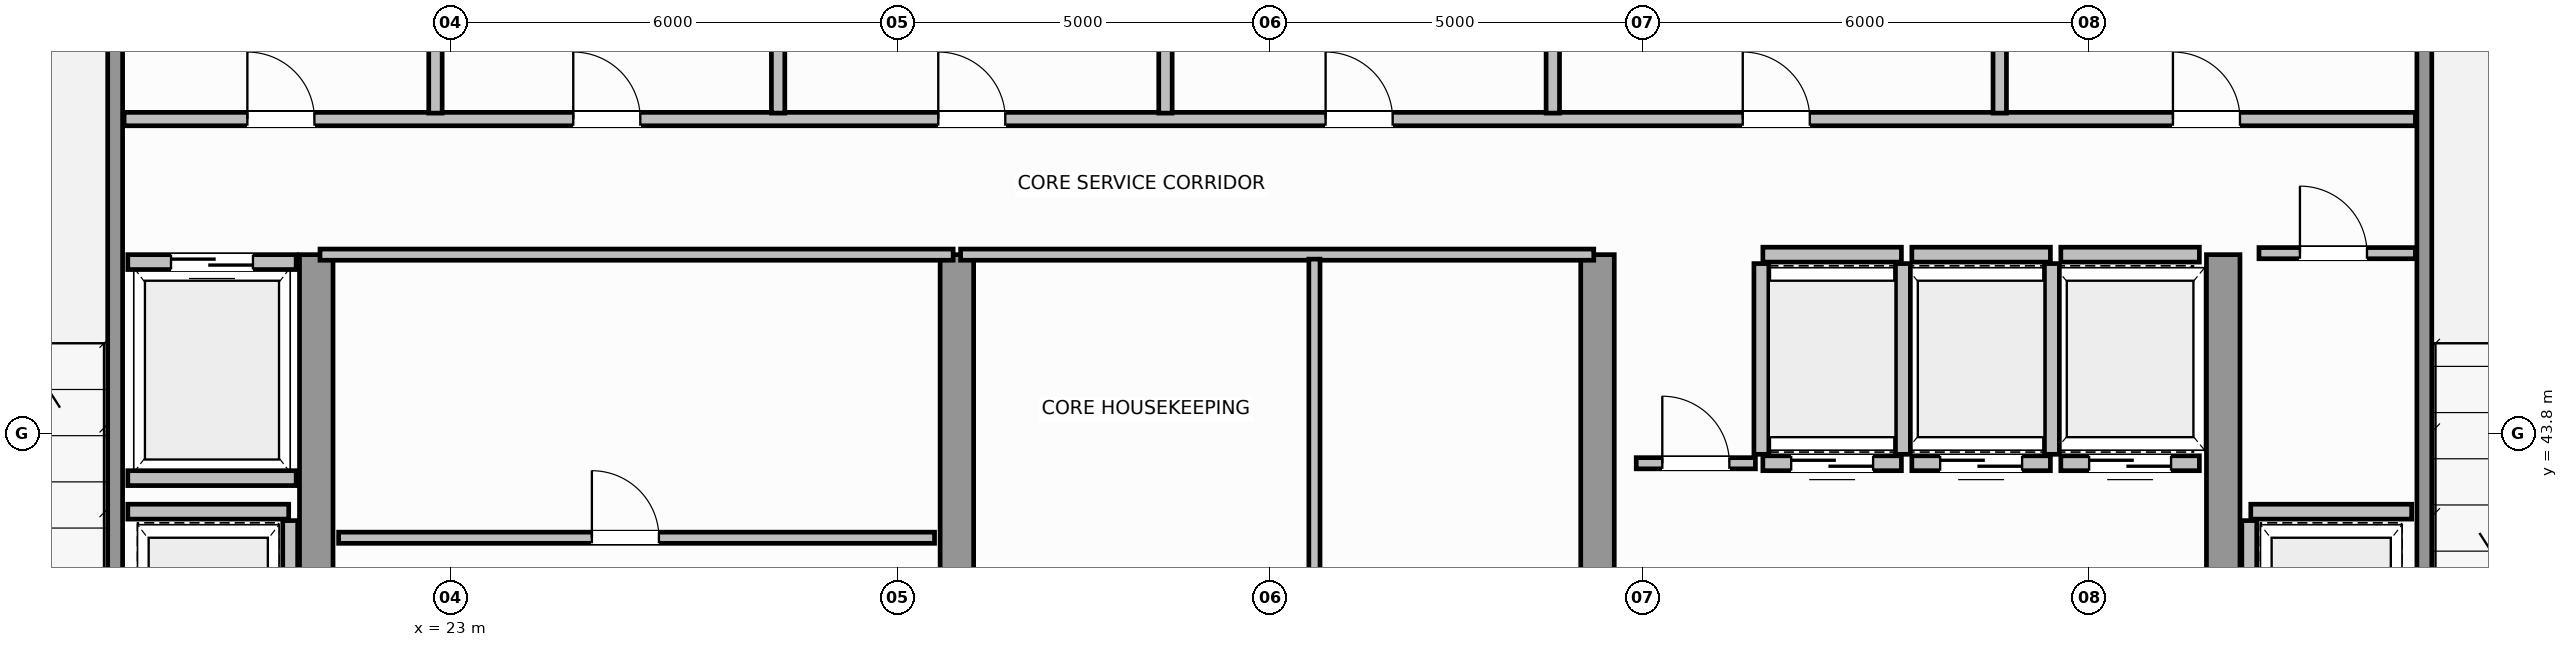
"""IFC4 building model, lengths in metres.
Left out: names, types, materials, properties, quantities, classifications, styles, units other than length and angle.
Written with IfcOpenShell. Run it as: python <this file> out.ifc"""

import sys

from ifc_helpers import new_model, si_unit, direction, frame, frame_2d, origin, place, context, subcontext, project, spatial, rectangle, extrude, source, transform, mapped, element, fill, save


model = new_model("IFC4")
c1 = context("Model", 3, precision=1e-05, world=origin(), true_north=direction((0.0, 1.0)))
c2 = subcontext(c1, "Body", "Model", "MODEL_VIEW")
j1 = project(units=[si_unit("LENGTHUNIT", "METRE"), si_unit("PLANEANGLEUNIT", "RADIAN")], contexts=[c1])
p1 = place(None, origin())
s1 = spatial("IfcSite", under=j1, at=p1, CompositionType="ELEMENT")
p2 = place(p1, origin())
s2 = spatial("IfcBuilding", under=s1, at=p2, CompositionType="ELEMENT")
p3 = place(p2, frame((0.0, 0.0, 295.4)))
s3 = spatial("IfcBuildingStorey", under=s2, at=p3, CompositionType="ELEMENT", Elevation=295.4)
for number, where, z_axis, x_axis in (
    (1, (21.2, 36.745, 0.0), (0.0, 0.0, 1.0), (0.0, 1.0, 0.0)),
    (2, (29.8, 36.745, 0.0), (0.0, 0.0, 1.0), (0.0, 1.0, 0.0)),
    (3, (38.4, 36.745, 0.0), (0.0, 0.0, 1.0), (0.0, 1.0, 0.0)),
    (4, (46.8, 36.745, 0.0), (0.0, 0.0, 1.0), (0.0, 1.0, 0.0)),
):
    element("IfcWall", number, at=place(p3, frame(where, z_axis=z_axis, x_axis=x_axis)), inside=s3, PredefinedType="SHEAR", context=c2, shape_type="SweptSolid", body=[
        extrude(rectangle(XDim=9.455, YDim=0.45, at=frame_2d((4.728, 0.0))), origin(), (0.0, 0.0, 1.0), 3.8),
    ])
for number, where, z_axis, x_axis in (
    (5, (18.5, 39.96, 0.0), (0.0, 0.0, 1.0), (0.0, 1.0, 0.0)),
    (6, (49.5, 39.96, 0.0), (0.0, 0.0, 1.0), (0.0, 1.0, 0.0)),
):
    element("IfcWall", number, at=place(p3, frame(where, z_axis=z_axis, x_axis=x_axis)), inside=s3, PredefinedType="SOLIDWALL", context=c2, shape_type="SweptSolid", body=[
        extrude(rectangle(XDim=9.93, YDim=0.2, at=frame_2d((4.965, 0.0))), origin(), (0.0, 0.0, 1.0), 3.8),
    ])
p4 = place(p3, frame((40.62, 43.4, 0.0), z_axis=(0.0, 0.0, 1.0), x_axis=(1.0, 0.0, 0.0)))
e7 = element("IfcWall", 7, at=p4, inside=s3, PredefinedType="SOLIDWALL", context=c2, shape_type="SweptSolid", body=[
    extrude(rectangle(XDim=1.86, YDim=0.2, at=frame_2d((0.93, 0.0))), origin(), (0.0, 0.0, 1.0), 3.58),
])
p5 = place(p4, frame((0.38, 0.0, 0.0)))
e8 = element("IfcOpeningElement", 8, at=p5, cuts=e7, PredefinedType="OPENING", context=c2, shape_type="SweptSolid", body=[
    extrude(rectangle(XDim=1.1, YDim=2.15, at=frame_2d((0.55, 1.075))), frame((0.0, 0.11, 0.0), z_axis=(0.0, -1.0, 0.0), x_axis=(1.0, 0.0, 0.0)), (0.0, 0.0, 1.0), 0.22),
])
p6 = place(p3, frame((40.62, 46.2, 0.0), z_axis=(0.0, 0.0, 1.0), x_axis=(1.0, 0.0, 0.0)))
e9 = element("IfcWall", 9, at=p6, inside=s3, PredefinedType="SOLIDWALL", context=c2, shape_type="SweptSolid", body=[
    extrude(rectangle(XDim=1.86, YDim=0.2, at=frame_2d((0.93, 0.0))), origin(), (0.0, 0.0, 1.0), 3.58),
])
for number, where, z_axis, x_axis in (
    (10, (40.6, 43.52, 0.0), (0.0, 0.0, 1.0), (0.0, 1.0, 0.0)),
    (11, (42.5, 43.52, 0.0), (0.0, 0.0, 1.0), (0.0, 1.0, 0.0)),
):
    element("IfcWall", number, at=place(p3, frame(where, z_axis=z_axis, x_axis=x_axis)), inside=s3, PredefinedType="SOLIDWALL", context=c2, shape_type="SweptSolid", body=[
        extrude(rectangle(XDim=2.56, YDim=0.2, at=frame_2d((1.28, 0.0))), origin(), (0.0, 0.0, 1.0), 3.58),
    ])
p7 = place(p3, frame((42.62, 43.4, 0.0), z_axis=(0.0, 0.0, 1.0), x_axis=(1.0, 0.0, 0.0)))
e12 = element("IfcWall", 12, at=p7, inside=s3, PredefinedType="SOLIDWALL", context=c2, shape_type="SweptSolid", body=[
    extrude(rectangle(XDim=1.86, YDim=0.2, at=frame_2d((0.93, 0.0))), origin(), (0.0, 0.0, 1.0), 3.58),
])
p8 = place(p7, frame((0.38, 0.0, 0.0)))
e13 = element("IfcOpeningElement", 13, at=p8, cuts=e12, PredefinedType="OPENING", context=c2, shape_type="SweptSolid", body=[
    extrude(rectangle(XDim=1.1, YDim=2.15, at=frame_2d((0.55, 1.075))), frame((0.0, 0.11, 0.0), z_axis=(0.0, -1.0, 0.0), x_axis=(1.0, 0.0, 0.0)), (0.0, 0.0, 1.0), 0.22),
])
p9 = place(p3, frame((42.62, 46.2, 0.0), z_axis=(0.0, 0.0, 1.0), x_axis=(1.0, 0.0, 0.0)))
e14 = element("IfcWall", 14, at=p9, inside=s3, PredefinedType="SOLIDWALL", context=c2, shape_type="SweptSolid", body=[
    extrude(rectangle(XDim=1.86, YDim=0.2, at=frame_2d((0.93, 0.0))), origin(), (0.0, 0.0, 1.0), 3.58),
])
p10 = place(p3, frame((44.5, 43.52, 0.0), z_axis=(0.0, 0.0, 1.0), x_axis=(0.0, 1.0, 0.0)))
e15 = element("IfcWall", 15, at=p10, inside=s3, PredefinedType="SOLIDWALL", context=c2, shape_type="SweptSolid", body=[
    extrude(rectangle(XDim=2.56, YDim=0.2, at=frame_2d((1.28, 0.0))), origin(), (0.0, 0.0, 1.0), 3.58),
])
p11 = place(p3, frame((44.62, 43.4, 0.0), z_axis=(0.0, 0.0, 1.0), x_axis=(1.0, 0.0, 0.0)))
e16 = element("IfcWall", 16, at=p11, inside=s3, PredefinedType="SOLIDWALL", context=c2, shape_type="SweptSolid", body=[
    extrude(rectangle(XDim=1.86, YDim=0.2, at=frame_2d((0.93, 0.0))), origin(), (0.0, 0.0, 1.0), 3.58),
])
p12 = place(p11, frame((0.38, 0.0, 0.0)))
e17 = element("IfcOpeningElement", 17, at=p12, cuts=e16, PredefinedType="OPENING", context=c2, shape_type="SweptSolid", body=[
    extrude(rectangle(XDim=1.1, YDim=2.15, at=frame_2d((0.55, 1.075))), frame((0.0, 0.11, 0.0), z_axis=(0.0, -1.0, 0.0), x_axis=(1.0, 0.0, 0.0)), (0.0, 0.0, 1.0), 0.22),
])
p13 = place(p3, frame((44.62, 46.2, 0.0), z_axis=(0.0, 0.0, 1.0), x_axis=(1.0, 0.0, 0.0)))
e18 = element("IfcWall", 18, at=p13, inside=s3, PredefinedType="SOLIDWALL", context=c2, shape_type="SweptSolid", body=[
    extrude(rectangle(XDim=1.86, YDim=0.2, at=frame_2d((0.93, 0.0))), origin(), (0.0, 0.0, 1.0), 3.58),
])
p14 = place(p3, frame((18.67, 46.1, 0.0), z_axis=(0.0, 0.0, 1.0), x_axis=(1.0, 0.0, 0.0)))
e19 = element("IfcWall", 19, at=p14, inside=s3, PredefinedType="SOLIDWALL", context=c2, shape_type="SweptSolid", body=[
    extrude(rectangle(XDim=2.26, YDim=0.2, at=frame_2d((1.13, 0.0))), origin(), (0.0, 0.0, 1.0), 3.58),
])
p15 = place(p14, frame((0.58, 0.0, 0.0)))
e20 = element("IfcOpeningElement", 20, at=p15, cuts=e19, PredefinedType="OPENING", context=c2, shape_type="SweptSolid", body=[
    extrude(rectangle(XDim=1.1, YDim=2.15, at=frame_2d((0.55, 1.075))), frame((0.0, 0.11, 0.0), z_axis=(0.0, -1.0, 0.0), x_axis=(1.0, 0.0, 0.0)), (0.0, 0.0, 1.0), 0.22),
])
p16 = place(p3, frame((18.67, 43.2, 0.0), z_axis=(0.0, 0.0, 1.0), x_axis=(1.0, 0.0, 0.0)))
e21 = element("IfcWall", 21, at=p16, inside=s3, PredefinedType="SOLIDWALL", context=c2, shape_type="SweptSolid", body=[
    extrude(rectangle(XDim=2.26, YDim=0.2, at=frame_2d((1.13, 0.0))), origin(), (0.0, 0.0, 1.0), 3.58),
])
p17 = place(p3, frame((18.67, 42.75, 0.0), z_axis=(0.0, 0.0, 1.0), x_axis=(1.0, 0.0, 0.0)))
e22 = element("IfcWall", 22, at=p17, inside=s3, PredefinedType="SOLIDWALL", context=c2, shape_type="SweptSolid", body=[
    extrude(rectangle(XDim=2.16, YDim=0.2, at=frame_2d((1.08, 0.0))), origin(), (0.0, 0.0, 1.0), 3.58),
])
p18 = place(p3, frame((20.85, 40.07, 0.0), z_axis=(0.0, 0.0, 1.0), x_axis=(0.0, 1.0, 0.0)))
e23 = element("IfcWall", 23, at=p18, inside=s3, PredefinedType="SOLIDWALL", context=c2, shape_type="SweptSolid", body=[
    extrude(rectangle(XDim=2.56, YDim=0.2, at=frame_2d((1.28, 0.0))), origin(), (0.0, 0.0, 1.0), 3.58),
])
p19 = place(p3, frame((47.17, 42.75, 0.0), z_axis=(0.0, 0.0, 1.0), x_axis=(1.0, 0.0, 0.0)))
e24 = element("IfcWall", 24, at=p19, inside=s3, PredefinedType="SOLIDWALL", context=c2, shape_type="SweptSolid", body=[
    extrude(rectangle(XDim=2.16, YDim=0.2, at=frame_2d((1.08, 0.0))), origin(), (0.0, 0.0, 1.0), 3.58),
])
p20 = place(p3, frame((47.15, 40.07, 0.0), z_axis=(0.0, 0.0, 1.0), x_axis=(0.0, 1.0, 0.0)))
e25 = element("IfcWall", 25, at=p20, inside=s3, PredefinedType="SOLIDWALL", context=c2, shape_type="SweptSolid", body=[
    extrude(rectangle(XDim=2.56, YDim=0.2, at=frame_2d((1.28, 0.0))), origin(), (0.0, 0.0, 1.0), 3.58),
])
p21 = place(p3, frame((21.25, 46.2, 0.0), z_axis=(0.0, 0.0, 1.0), x_axis=(1.0, 0.0, 0.0)))
e26 = element("IfcWall", 26, at=p21, inside=s3, PredefinedType="PARTITIONING", context=c2, shape_type="SweptSolid", body=[
    extrude(rectangle(XDim=8.5, YDim=0.15, at=frame_2d((4.25, 0.0))), origin(), (0.0, 0.0, 1.0), 3.58),
])
p22 = place(p3, frame((21.5, 42.4, 0.0), z_axis=(0.0, 0.0, 1.0), x_axis=(1.0, 0.0, 0.0)))
e27 = element("IfcWall", 27, at=p22, inside=s3, PredefinedType="PARTITIONING", context=c2, shape_type="SweptSolid", body=[
    extrude(rectangle(XDim=8.0, YDim=0.15, at=frame_2d((4.0, 0.0))), origin(), (0.0, 0.0, 1.0), 3.58),
])
p23 = place(p22, frame((3.4, 0.0, 0.0)))
e28 = element("IfcOpeningElement", 28, at=p23, cuts=e27, PredefinedType="OPENING", context=c2, shape_type="SweptSolid", body=[
    extrude(rectangle(XDim=0.9, YDim=2.1, at=frame_2d((0.45, 1.05))), frame((0.0, 0.085, 0.0), z_axis=(0.0, -1.0, 0.0), x_axis=(1.0, 0.0, 0.0)), (0.0, 0.0, 1.0), 0.17),
])
p24 = place(p3, frame((29.85, 46.2, 0.0), z_axis=(0.0, 0.0, 1.0), x_axis=(1.0, 0.0, 0.0)))
e29 = element("IfcWall", 29, at=p24, inside=s3, PredefinedType="PARTITIONING", context=c2, shape_type="SweptSolid", body=[
    extrude(rectangle(XDim=8.5, YDim=0.15, at=frame_2d((4.25, 0.0))), origin(), (0.0, 0.0, 1.0), 3.58),
])
p25 = place(p3, frame((34.6, 36.56, 0.0), z_axis=(0.0, 0.0, 1.0), x_axis=(0.0, 1.0, 0.0)))
e30 = element("IfcWall", 30, at=p25, inside=s3, PredefinedType="PARTITIONING", context=c2, shape_type="SweptSolid", body=[
    extrude(rectangle(XDim=9.58, YDim=0.15, at=frame_2d((4.79, 0.0))), origin(), (0.0, 0.0, 1.0), 3.58),
])
p26 = place(p25, frame((4.2, 0.0, 0.0)))
e31 = element("IfcOpeningElement", 31, at=p26, cuts=e30, PredefinedType="OPENING", context=c2, shape_type="SweptSolid", body=[
    extrude(rectangle(XDim=0.9, YDim=2.1, at=frame_2d((0.45, 1.05))), frame((0.0, 0.085, 0.0), z_axis=(0.0, -1.0, 0.0), x_axis=(1.0, 0.0, 0.0)), (0.0, 0.0, 1.0), 0.17),
])
p27 = place(p3, frame((47.28, 46.22, 0.0), z_axis=(0.0, 0.0, 1.0), x_axis=(1.0, 0.0, 0.0)))
e32 = element("IfcWall", 32, at=p27, inside=s3, PredefinedType="PARTITIONING", context=c2, shape_type="SweptSolid", body=[
    extrude(rectangle(XDim=2.1, YDim=0.15, at=frame_2d((1.05, 0.0))), origin(), (0.0, 0.0, 1.0), 3.58),
])
p28 = place(p27, frame((0.55, 0.0, 0.0)))
e33 = element("IfcOpeningElement", 33, at=p28, cuts=e32, PredefinedType="OPENING", context=c2, shape_type="SweptSolid", body=[
    extrude(rectangle(XDim=0.9, YDim=2.1, at=frame_2d((0.45, 1.05))), frame((0.0, 0.085, 0.0), z_axis=(0.0, -1.0, 0.0), x_axis=(1.0, 0.0, 0.0)), (0.0, 0.0, 1.0), 0.17),
])
p29 = place(p3, frame((38.92, 43.4, 0.0), z_axis=(0.0, 0.0, 1.0), x_axis=(1.0, 0.0, 0.0)))
e34 = element("IfcWall", 34, at=p29, inside=s3, PredefinedType="PARTITIONING", context=c2, shape_type="SweptSolid", body=[
    extrude(rectangle(XDim=1.6, YDim=0.15, at=frame_2d((0.8, 0.0))), origin(), (0.0, 0.0, 1.0), 3.58),
])
p30 = place(p29, frame((0.35, 0.0, 0.0)))
e35 = element("IfcOpeningElement", 35, at=p30, cuts=e34, PredefinedType="OPENING", context=c2, shape_type="SweptSolid", body=[
    extrude(rectangle(XDim=0.9, YDim=2.1, at=frame_2d((0.45, 1.05))), frame((0.0, 0.085, 0.0), z_axis=(0.0, -1.0, 0.0), x_axis=(1.0, 0.0, 0.0)), (0.0, 0.0, 1.0), 0.17),
])
p31 = place(p3, frame((18.62, 48.02, 0.0), z_axis=(0.0, 0.0, 1.0), x_axis=(1.0, 0.0, 0.0)))
e36 = element("IfcWall", 36, at=p31, inside=s3, PredefinedType="PLUMBINGWALL", context=c2, shape_type="SweptSolid", body=[
    extrude(rectangle(XDim=30.76, YDim=0.18, at=frame_2d((15.38, 0.0))), origin(), (0.0, 0.0, 1.0), 3.58),
])
p32 = place(p31, frame((1.655, 0.0, 0.0)))
e37 = element("IfcOpeningElement", 37, at=p32, cuts=e36, PredefinedType="OPENING", context=c2, shape_type="SweptSolid", body=[
    extrude(rectangle(XDim=0.9, YDim=2.15, at=frame_2d((0.45, 1.075))), frame((0.0, 0.1, 0.0), z_axis=(0.0, -1.0, 0.0), x_axis=(1.0, 0.0, 0.0)), (0.0, 0.0, 1.0), 0.2),
])
p33 = place(p31, frame((6.03, 0.0, 0.0)))
e38 = element("IfcOpeningElement", 38, at=p33, cuts=e36, PredefinedType="OPENING", context=c2, shape_type="SweptSolid", body=[
    extrude(rectangle(XDim=0.9, YDim=2.15, at=frame_2d((0.45, 1.075))), frame((0.0, 0.1, 0.0), z_axis=(0.0, -1.0, 0.0), x_axis=(1.0, 0.0, 0.0)), (0.0, 0.0, 1.0), 0.2),
])
p34 = place(p31, frame((10.93, 0.0, 0.0)))
e39 = element("IfcOpeningElement", 39, at=p34, cuts=e36, PredefinedType="OPENING", context=c2, shape_type="SweptSolid", body=[
    extrude(rectangle(XDim=0.9, YDim=2.15, at=frame_2d((0.45, 1.075))), frame((0.0, 0.1, 0.0), z_axis=(0.0, -1.0, 0.0), x_axis=(1.0, 0.0, 0.0)), (0.0, 0.0, 1.0), 0.2),
])
p35 = place(p31, frame((16.13, 0.0, 0.0)))
e40 = element("IfcOpeningElement", 40, at=p35, cuts=e36, PredefinedType="OPENING", context=c2, shape_type="SweptSolid", body=[
    extrude(rectangle(XDim=0.9, YDim=2.15, at=frame_2d((0.45, 1.075))), frame((0.0, 0.1, 0.0), z_axis=(0.0, -1.0, 0.0), x_axis=(1.0, 0.0, 0.0)), (0.0, 0.0, 1.0), 0.2),
])
p36 = place(p31, frame((21.73, 0.0, 0.0)))
e41 = element("IfcOpeningElement", 41, at=p36, cuts=e36, PredefinedType="OPENING", context=c2, shape_type="SweptSolid", body=[
    extrude(rectangle(XDim=0.9, YDim=2.15, at=frame_2d((0.45, 1.075))), frame((0.0, 0.1, 0.0), z_axis=(0.0, -1.0, 0.0), x_axis=(1.0, 0.0, 0.0)), (0.0, 0.0, 1.0), 0.2),
])
p37 = place(p31, frame((27.505, 0.0, 0.0)))
e42 = element("IfcOpeningElement", 42, at=p37, cuts=e36, PredefinedType="OPENING", context=c2, shape_type="SweptSolid", body=[
    extrude(rectangle(XDim=0.9, YDim=2.15, at=frame_2d((0.45, 1.075))), frame((0.0, 0.1, 0.0), z_axis=(0.0, -1.0, 0.0), x_axis=(1.0, 0.0, 0.0)), (0.0, 0.0, 1.0), 0.2),
])
p38 = place(p3, frame((22.8, 48.1, 0.0), z_axis=(0.0, 0.0, 1.0), x_axis=(0.0, 1.0, 0.0)))
e43 = element("IfcWall", 43, at=p38, inside=s3, PredefinedType="PLUMBINGWALL", context=c2, shape_type="SweptSolid", body=[
    extrude(rectangle(XDim=2.43, YDim=0.18, at=frame_2d((1.215, 0.0))), origin(), (0.0, 0.0, 1.0), 3.12),
])
for number, where, z_axis, x_axis in (
    (44, (27.4, 48.1, 0.0), (0.0, 0.0, 1.0), (0.0, 1.0, 0.0)),
    (45, (32.6, 48.1, 0.0), (0.0, 0.0, 1.0), (0.0, 1.0, 0.0)),
    (46, (37.8, 48.1, 0.0), (0.0, 0.0, 1.0), (0.0, 1.0, 0.0)),
    (47, (43.8, 48.1, 0.0), (0.0, 0.0, 1.0), (0.0, 1.0, 0.0)),
):
    element("IfcWall", number, at=place(p3, frame(where, z_axis=z_axis, x_axis=x_axis)), inside=s3, PredefinedType="PLUMBINGWALL", context=c2, shape_type="SweptSolid", body=[
        extrude(rectangle(XDim=2.43, YDim=0.18, at=frame_2d((1.215, 0.0))), origin(), (0.0, 0.0, 1.0), 3.58),
    ])
m1 = source(origin(), c2, "Body", "SweptSolid", [
    extrude(rectangle(XDim=1.1, YDim=2.15, at=frame_2d((0.55, 1.075))), frame((0.0, 0.025, 0.0), z_axis=(0.0, -1.0, 0.0), x_axis=(1.0, 0.0, 0.0)), (0.0, 0.0, 1.0), 0.05),
])
p39 = place(p5, origin())
e48 = element("IfcDoor", 48, at=p39, inside=s3, OperationType="DOUBLE_DOOR_SLIDING", PredefinedType="DOOR", context=c2, shape_type="MappedRepresentation", body=[
    mapped(m1, transform((0.0, 0.0, 0.0), scale=1.0)),
])
fill(e8, e48)
p40 = place(p8, origin())
e49 = element("IfcDoor", 49, at=p40, inside=s3, OperationType="DOUBLE_DOOR_SLIDING", PredefinedType="DOOR", context=c2, shape_type="MappedRepresentation", body=[
    mapped(m1, transform((0.0, 0.0, 0.0), scale=1.0)),
])
fill(e13, e49)
p41 = place(p12, origin())
e50 = element("IfcDoor", 50, at=p41, inside=s3, OperationType="DOUBLE_DOOR_SLIDING", PredefinedType="DOOR", context=c2, shape_type="MappedRepresentation", body=[
    mapped(m1, transform((0.0, 0.0, 0.0), scale=1.0)),
])
fill(e17, e50)
p42 = place(p15, origin())
e51 = element("IfcDoor", 51, at=p42, inside=s3, OperationType="DOUBLE_DOOR_SLIDING", PredefinedType="DOOR", context=c2, shape_type="MappedRepresentation", body=[
    mapped(m1, transform((0.0, 0.0, 0.0), scale=1.0)),
])
fill(e20, e51)
m2 = source(origin(), c2, "Body", "SweptSolid", [
    extrude(rectangle(XDim=0.9, YDim=2.1, at=frame_2d((0.45, 1.05))), frame((0.0, 0.025, 0.0), z_axis=(0.0, -1.0, 0.0), x_axis=(1.0, 0.0, 0.0)), (0.0, 0.0, 1.0), 0.05),
])
p43 = place(p23, origin())
e52 = element("IfcDoor", 52, at=p43, inside=s3, OperationType="SINGLE_SWING_RIGHT", PredefinedType="DOOR", context=c2, shape_type="MappedRepresentation", body=[
    mapped(m2, transform((0.0, 0.0, 0.0), scale=1.0)),
])
fill(e28, e52)
p44 = place(p28, origin())
e53 = element("IfcDoor", 53, at=p44, inside=s3, OperationType="SINGLE_SWING_RIGHT", PredefinedType="DOOR", context=c2, shape_type="MappedRepresentation", body=[
    mapped(m2, transform((0.0, 0.0, 0.0), scale=1.0)),
])
fill(e33, e53)
p45 = place(p30, origin())
e54 = element("IfcDoor", 54, at=p45, inside=s3, OperationType="SINGLE_SWING_LEFT", PredefinedType="DOOR", context=c2, shape_type="MappedRepresentation", body=[
    mapped(m2, transform((0.0, 0.0, 0.0), scale=1.0)),
])
fill(e35, e54)
m3 = source(origin(), c2, "Body", "SweptSolid", [
    extrude(rectangle(XDim=0.9, YDim=2.15, at=frame_2d((0.45, 1.075))), frame((0.0, 0.025, 0.0), z_axis=(0.0, -1.0, 0.0), x_axis=(1.0, 0.0, 0.0)), (0.0, 0.0, 1.0), 0.05),
])
p46 = place(p32, origin())
e55 = element("IfcDoor", 55, at=p46, inside=s3, OperationType="SINGLE_SWING_LEFT", PredefinedType="DOOR", context=c2, shape_type="MappedRepresentation", body=[
    mapped(m3, transform((0.0, 0.0, 0.0), scale=1.0)),
])
fill(e37, e55)
p47 = place(p33, origin())
e56 = element("IfcDoor", 56, at=p47, inside=s3, OperationType="SINGLE_SWING_RIGHT", PredefinedType="DOOR", context=c2, shape_type="MappedRepresentation", body=[
    mapped(m3, transform((0.0, 0.0, 0.0), scale=1.0)),
])
fill(e38, e56)
p48 = place(p34, origin())
e57 = element("IfcDoor", 57, at=p48, inside=s3, OperationType="SINGLE_SWING_LEFT", PredefinedType="DOOR", context=c2, shape_type="MappedRepresentation", body=[
    mapped(m3, transform((0.0, 0.0, 0.0), scale=1.0)),
])
fill(e39, e57)
p49 = place(p35, origin())
e58 = element("IfcDoor", 58, at=p49, inside=s3, OperationType="SINGLE_SWING_RIGHT", PredefinedType="DOOR", context=c2, shape_type="MappedRepresentation", body=[
    mapped(m3, transform((0.0, 0.0, 0.0), scale=1.0)),
])
fill(e40, e58)
p50 = place(p36, origin())
e59 = element("IfcDoor", 59, at=p50, inside=s3, OperationType="SINGLE_SWING_LEFT", PredefinedType="DOOR", context=c2, shape_type="MappedRepresentation", body=[
    mapped(m3, transform((0.0, 0.0, 0.0), scale=1.0)),
])
fill(e41, e59)
p51 = place(p37, origin())
e60 = element("IfcDoor", 60, at=p51, inside=s3, OperationType="SINGLE_SWING_RIGHT", PredefinedType="DOOR", context=c2, shape_type="MappedRepresentation", body=[
    mapped(m3, transform((0.0, 0.0, 0.0), scale=1.0)),
])
fill(e42, e60)
save(model, sys.argv[1])
